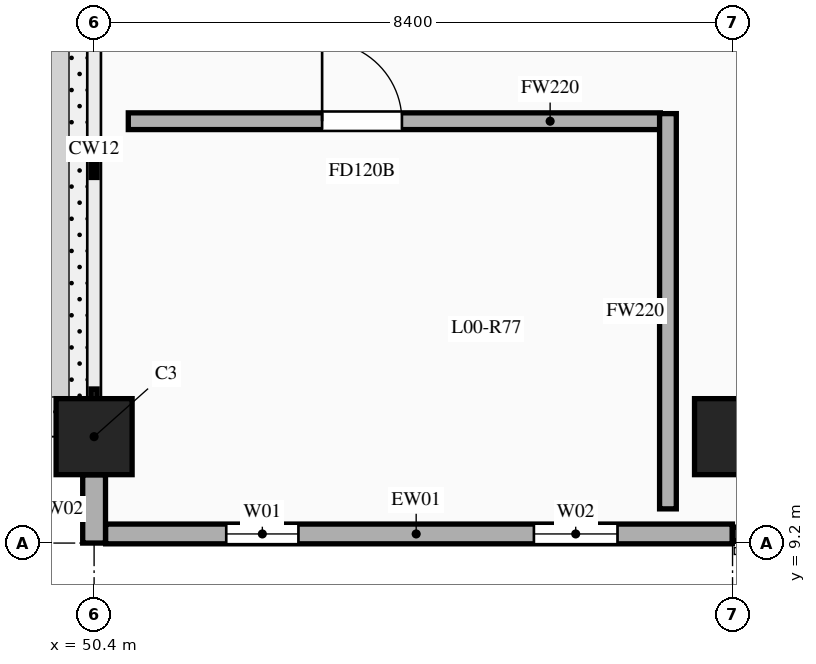
"""IFC4 building model, lengths in metres.
Left out: names, types, materials, properties, quantities, classifications, styles, units other than length and angle.
Written with IfcOpenShell. Run it as: python <this file> out.ifc"""

import sys

from ifc_helpers import new_model, si_unit, direction, frame, frame_2d, origin, origin_2d, place, context, subcontext, project, spatial, rectangle, extrude, element, fill, save


model = new_model("IFC4")
c1 = context("Model", 3, precision=1e-05, world=origin(), true_north=direction((0.0, 1.0)))
c2 = subcontext(c1, "Body", "Model", "MODEL_VIEW")
j1 = project(units=[si_unit("LENGTHUNIT", "METRE"), si_unit("PLANEANGLEUNIT", "RADIAN")], contexts=[c1])
p1 = place(None, origin())
s1 = spatial("IfcSite", under=j1, at=p1, CompositionType="ELEMENT")
p2 = place(p1, origin())
s2 = spatial("IfcBuilding", under=s1, at=p2, CompositionType="ELEMENT")
p3 = place(p2, origin())
s3 = spatial("IfcBuildingStorey", under=s2, at=p3, CompositionType="ELEMENT", Elevation=0.0)
for number, where, z_axis, x_axis in (
    (1, (50.4, 10.6, 0.0), (0.0, 0.0, 1.0), (1.0, 0.0, 0.0)),
    (2, (58.8, 10.6, 0.0), (0.0, 0.0, 1.0), (1.0, 0.0, 0.0)),
):
    element("IfcColumn", number, at=place(p3, frame(where, z_axis=z_axis, x_axis=x_axis)), inside=s3, PredefinedType="COLUMN", context=c2, shape_type="SweptSolid", body=[
        extrude(rectangle(XDim=1.0, YDim=1.0, at=origin_2d()), origin(), (0.0, 0.0, 1.0), 5.4),
    ])
p4 = place(p3, frame((50.4, 9.2, 0.0), z_axis=(0.0, 0.0, 1.0), x_axis=(0.0, 1.0, 0.0)))
e3 = element("IfcWall", 3, at=p4, inside=s3, PredefinedType="SOLIDWALL", context=c2, shape_type="SweptSolid", body=[
    extrude(rectangle(XDim=0.898, YDim=0.3, at=frame_2d((0.449, 0.0))), origin(), (0.0, 0.0, 1.0), 4.45),
])
p5 = place(p3, frame((50.552, 9.32, 0.0), z_axis=(0.0, 0.0, 1.0), x_axis=(1.0, 0.0, 0.0)))
e4 = element("IfcWall", 4, at=p5, inside=s3, PredefinedType="SOLIDWALL", context=c2, shape_type="SweptSolid", body=[
    extrude(rectangle(XDim=8.246, YDim=0.26, at=frame_2d((4.123, 0.0))), origin(), (0.0, 0.0, 1.0), 4.45),
])
p6 = place(p5, frame((1.586, 0.0, 0.9)))
e5 = element("IfcOpeningElement", 5, at=p6, cuts=e4, PredefinedType="OPENING", context=c2, shape_type="SweptSolid", body=[
    extrude(rectangle(XDim=0.95, YDim=1.8, at=frame_2d((0.475, 0.9))), frame((0.0, 0.14, 0.0), z_axis=(0.0, -1.0, 0.0), x_axis=(1.0, 0.0, 0.0)), (0.0, 0.0, 1.0), 0.28),
])
p7 = place(p5, frame((5.635, 0.0, 0.9)))
e6 = element("IfcOpeningElement", 6, at=p7, cuts=e4, PredefinedType="OPENING", context=c2, shape_type="SweptSolid", body=[
    extrude(rectangle(XDim=1.1, YDim=1.95, at=frame_2d((0.55, 0.975))), frame((0.0, 0.14, 0.0), z_axis=(0.0, -1.0, 0.0), x_axis=(1.0, 0.0, 0.0)), (0.0, 0.0, 1.0), 0.28),
])
p8 = place(p3, frame((50.85, 14.75, 0.0), z_axis=(0.0, 0.0, 1.0), x_axis=(1.0, 0.0, 0.0)))
e7 = element("IfcWall", 7, at=p8, inside=s3, PredefinedType="SOLIDWALL", context=c2, shape_type="SweptSolid", body=[
    extrude(rectangle(XDim=7.0, YDim=0.22, at=frame_2d((3.5, 0.0))), origin(), (0.0, 0.0, 1.0), 5.2),
])
p9 = place(p8, frame((2.55, 0.0, 0.0)))
e8 = element("IfcOpeningElement", 8, at=p9, cuts=e7, PredefinedType="OPENING", context=c2, shape_type="SweptSolid", body=[
    extrude(rectangle(XDim=1.05, YDim=2.15, at=frame_2d((0.525, 1.075))), frame((0.0, 0.12, 0.0), z_axis=(0.0, -1.0, 0.0), x_axis=(1.0, 0.0, 0.0)), (0.0, 0.0, 1.0), 0.24),
])
p10 = place(p3, frame((57.95, 9.65, 0.0), z_axis=(0.0, 0.0, 1.0), x_axis=(0.0, 1.0, 0.0)))
e9 = element("IfcWall", 9, at=p10, inside=s3, PredefinedType="SOLIDWALL", context=c2, shape_type="SweptSolid", body=[
    extrude(rectangle(XDim=5.2, YDim=0.22, at=frame_2d((2.6, 0.0))), origin(), (0.0, 0.0, 1.0), 5.2),
])
p11 = place(p6, origin())
e10 = element("IfcWindow", 10, at=p11, inside=s3, PartitioningType="SINGLE_PANEL", PredefinedType="WINDOW", context=c2, shape_type="SweptSolid", body=[
    extrude(rectangle(XDim=0.95, YDim=1.8, at=frame_2d((0.475, 0.9))), frame((0.0, 0.03, 0.0), z_axis=(0.0, -1.0, 0.0), x_axis=(1.0, 0.0, 0.0)), (0.0, 0.0, 1.0), 0.06),
])
fill(e5, e10)
p12 = place(p7, origin())
e11 = element("IfcWindow", 11, at=p12, inside=s3, PartitioningType="SINGLE_PANEL", PredefinedType="WINDOW", context=c2, shape_type="SweptSolid", body=[
    extrude(rectangle(XDim=1.1, YDim=1.95, at=frame_2d((0.55, 0.975))), frame((0.0, 0.03, 0.0), z_axis=(0.0, -1.0, 0.0), x_axis=(1.0, 0.0, 0.0)), (0.0, 0.0, 1.0), 0.06),
])
fill(e6, e11)
p13 = place(p9, origin())
e12 = element("IfcDoor", 12, at=p13, inside=s3, OperationType="SINGLE_SWING_LEFT", PredefinedType="DOOR", context=c2, shape_type="SweptSolid", body=[
    extrude(rectangle(XDim=1.05, YDim=2.15, at=frame_2d((0.525, 1.075))), frame((0.0, 0.025, 0.0), z_axis=(0.0, -1.0, 0.0), x_axis=(1.0, 0.0, 0.0)), (0.0, 0.0, 1.0), 0.05),
])
fill(e8, e12)
save(model, sys.argv[1])
